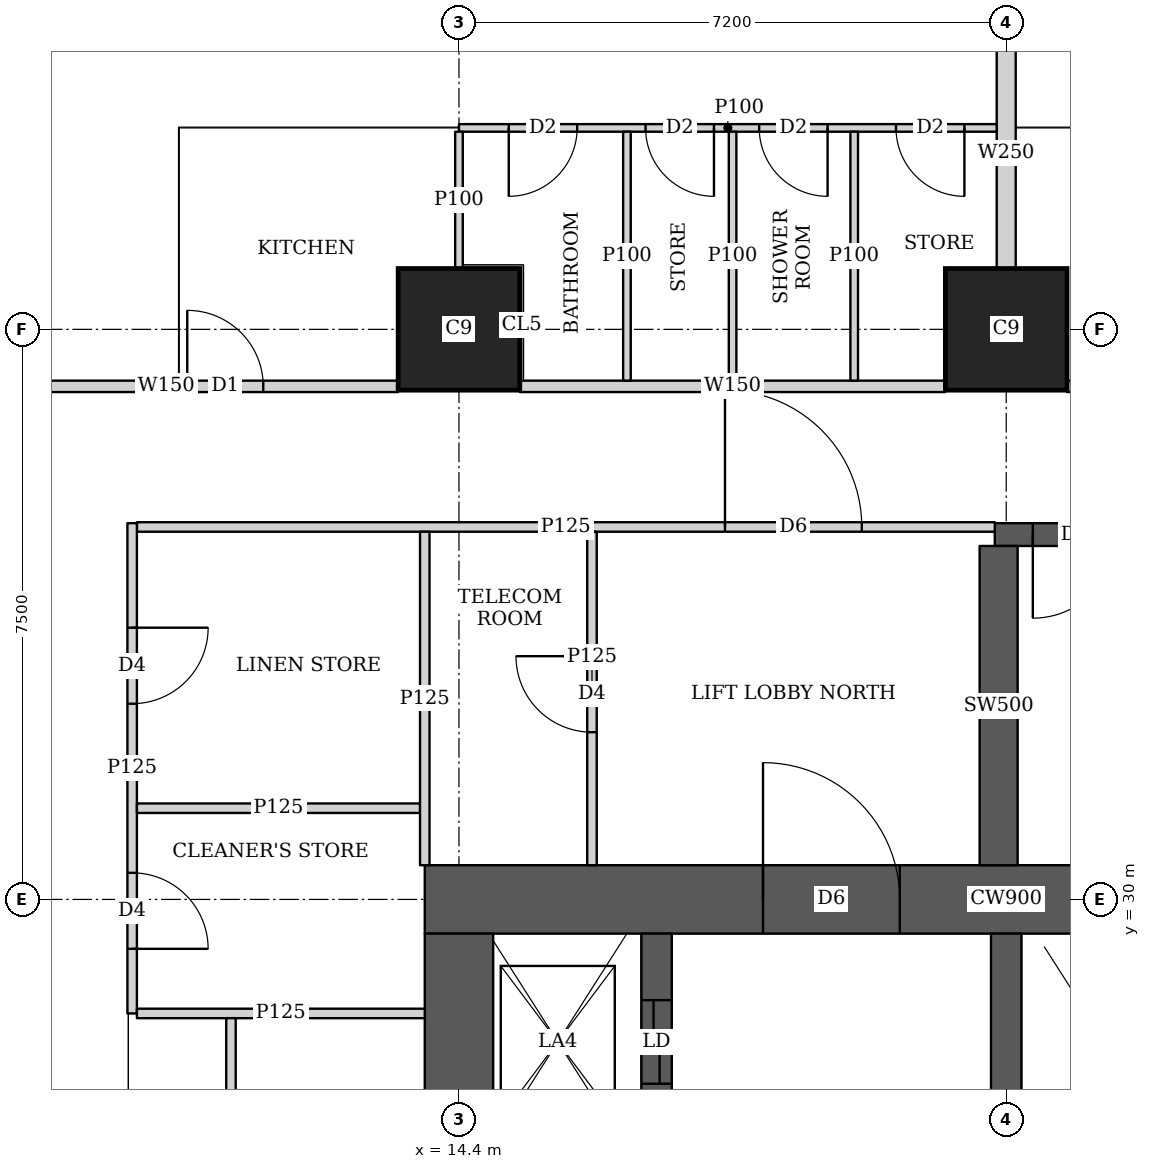
"""IFC4 building model, lengths in metres.
Left out: names, types, materials, properties, quantities, classifications, styles, units other than length and angle.
Written with IfcOpenShell. Run it as: python <this file> out.ifc"""

import sys

from ifc_helpers import new_model, si_unit, direction, frame, frame_2d, origin, origin_2d, place, context, subcontext, project, spatial, rectangle, extrude, element, fill, save


model = new_model("IFC4")
c1 = context("Model", 3, precision=1e-05, world=origin(), true_north=direction((0.0, 1.0)))
c2 = subcontext(c1, "Body", "Model", "MODEL_VIEW")
j1 = project(units=[si_unit("LENGTHUNIT", "METRE"), si_unit("PLANEANGLEUNIT", "RADIAN")], contexts=[c1])
p1 = place(None, origin())
s1 = spatial("IfcSite", under=j1, at=p1, CompositionType="ELEMENT")
p2 = place(p1, origin())
s2 = spatial("IfcBuilding", under=s1, at=p2, CompositionType="ELEMENT")
p3 = place(p2, frame((0.0, 0.0, 100.4)))
s3 = spatial("IfcBuildingStorey", under=s2, at=p3, CompositionType="ELEMENT", Elevation=100.4)
for number, where, z_axis, x_axis in (
    (1, (14.4, 37.5, 0.0), (0.0, 0.0, 1.0), (1.0, 0.0, 0.0)),
    (2, (21.6, 37.5, 0.0), (0.0, 0.0, 1.0), (1.0, 0.0, 0.0)),
):
    element("IfcColumn", number, at=place(p3, frame(where, z_axis=z_axis, x_axis=x_axis)), inside=s3, PredefinedType="COLUMN", context=c2, shape_type="SweptSolid", body=[
        extrude(rectangle(XDim=1.6, YDim=1.6, at=origin_2d()), origin(), (0.0, 0.0, 1.0), 3.75),
    ])
p4 = place(p3, frame((13.95, 30.0, 0.0), z_axis=(0.0, 0.0, 1.0), x_axis=(1.0, 0.0, 0.0)))
e3 = element("IfcWall", 3, at=p4, inside=s3, PredefinedType="SHEAR", context=c2, shape_type="SweptSolid", body=[
    extrude(rectangle(XDim=15.3, YDim=0.9, at=frame_2d((7.65, 0.0))), origin(), (0.0, 0.0, 1.0), 3.75),
])
p5 = place(p4, frame((4.45, 0.0, 0.0)))
e4 = element("IfcOpeningElement", 4, at=p5, cuts=e3, PredefinedType="OPENING", context=c2, shape_type="SweptSolid", body=[
    extrude(rectangle(XDim=1.8, YDim=2.1, at=frame_2d((0.9, 1.05))), frame((0.0, 0.46, 0.0), z_axis=(0.0, -1.0, 0.0), x_axis=(1.0, 0.0, 0.0)), (0.0, 0.0, 1.0), 0.92),
])
p6 = place(p4, frame((10.7, 0.0, 0.0)))
e5 = element("IfcOpeningElement", 5, at=p6, cuts=e3, PredefinedType="OPENING", context=c2, shape_type="SweptSolid", body=[
    extrude(rectangle(XDim=1.1, YDim=2.1, at=frame_2d((0.55, 1.05))), frame((0.0, 0.46, 0.0), z_axis=(0.0, -1.0, 0.0), x_axis=(1.0, 0.0, 0.0)), (0.0, 0.0, 1.0), 0.92),
])
p7 = place(p3, frame((14.4, 15.45, 0.0), z_axis=(0.0, 0.0, 1.0), x_axis=(0.0, 1.0, 0.0)))
e6 = element("IfcWall", 6, at=p7, inside=s3, PredefinedType="SHEAR", context=c2, shape_type="SweptSolid", body=[
    extrude(rectangle(XDim=14.1, YDim=0.9, at=frame_2d((7.05, 0.0))), origin(), (0.0, 0.0, 1.0), 3.75),
])
p8 = place(p3, frame((17.0, 15.45, 0.0), z_axis=(0.0, 0.0, 1.0), x_axis=(0.0, 1.0, 0.0)))
e7 = element("IfcWall", 7, at=p8, inside=s3, PredefinedType="SHEAR", context=c2, shape_type="SweptSolid", body=[
    extrude(rectangle(XDim=14.1, YDim=0.4, at=frame_2d((7.05, 0.0))), origin(), (0.0, 0.0, 1.0), 3.75),
])
p9 = place(p8, frame((0.875, 0.0, 0.0)))
e8 = element("IfcOpeningElement", 8, at=p9, cuts=e7, PredefinedType="OPENING", context=c2, shape_type="SweptSolid", body=[
    extrude(rectangle(XDim=1.1, YDim=2.1, at=frame_2d((0.55, 1.05))), frame((0.0, 0.21, 0.0), z_axis=(0.0, -1.0, 0.0), x_axis=(1.0, 0.0, 0.0)), (0.0, 0.0, 1.0), 0.42),
])
p10 = place(p8, frame((4.625, 0.0, 0.0)))
e9 = element("IfcOpeningElement", 9, at=p10, cuts=e7, PredefinedType="OPENING", context=c2, shape_type="SweptSolid", body=[
    extrude(rectangle(XDim=1.1, YDim=2.1, at=frame_2d((0.55, 1.05))), frame((0.0, 0.21, 0.0), z_axis=(0.0, -1.0, 0.0), x_axis=(1.0, 0.0, 0.0)), (0.0, 0.0, 1.0), 0.42),
])
p11 = place(p8, frame((8.375, 0.0, 0.0)))
e10 = element("IfcOpeningElement", 10, at=p11, cuts=e7, PredefinedType="OPENING", context=c2, shape_type="SweptSolid", body=[
    extrude(rectangle(XDim=1.1, YDim=2.1, at=frame_2d((0.55, 1.05))), frame((0.0, 0.21, 0.0), z_axis=(0.0, -1.0, 0.0), x_axis=(1.0, 0.0, 0.0)), (0.0, 0.0, 1.0), 0.42),
])
p12 = place(p8, frame((12.125, 0.0, 0.0)))
e11 = element("IfcOpeningElement", 11, at=p12, cuts=e7, PredefinedType="OPENING", context=c2, shape_type="SweptSolid", body=[
    extrude(rectangle(XDim=1.1, YDim=2.1, at=frame_2d((0.55, 1.05))), frame((0.0, 0.21, 0.0), z_axis=(0.0, -1.0, 0.0), x_axis=(1.0, 0.0, 0.0)), (0.0, 0.0, 1.0), 0.42),
])
p13 = place(p3, frame((21.6, 15.45, 0.0), z_axis=(0.0, 0.0, 1.0), x_axis=(0.0, 1.0, 0.0)))
e12 = element("IfcWall", 12, at=p13, inside=s3, PredefinedType="SHEAR", context=c2, shape_type="SweptSolid", body=[
    extrude(rectangle(XDim=14.1, YDim=0.4, at=frame_2d((7.05, 0.0))), origin(), (0.0, 0.0, 1.0), 3.75),
])
p14 = place(p3, frame((21.45, 34.8, 0.0), z_axis=(0.0, 0.0, 1.0), x_axis=(1.0, 0.0, 0.0)))
e13 = element("IfcWall", 13, at=p14, inside=s3, PredefinedType="SHEAR", context=c2, shape_type="SweptSolid", body=[
    extrude(rectangle(XDim=7.5, YDim=0.3, at=frame_2d((3.75, 0.0))), origin(), (0.0, 0.0, 1.0), 3.75),
])
p15 = place(p14, frame((0.5, 0.0, 0.0)))
e14 = element("IfcOpeningElement", 14, at=p15, cuts=e13, PredefinedType="OPENING", context=c2, shape_type="SweptSolid", body=[
    extrude(rectangle(XDim=1.1, YDim=2.1, at=frame_2d((0.55, 1.05))), frame((0.0, 0.16, 0.0), z_axis=(0.0, -1.0, 0.0), x_axis=(1.0, 0.0, 0.0)), (0.0, 0.0, 1.0), 0.32),
])
p16 = place(p3, frame((21.5, 30.45, 0.0), z_axis=(0.0, 0.0, 1.0), x_axis=(0.0, 1.0, 0.0)))
e15 = element("IfcWall", 15, at=p16, inside=s3, PredefinedType="SHEAR", context=c2, shape_type="SweptSolid", body=[
    extrude(rectangle(XDim=4.2, YDim=0.5, at=frame_2d((2.1, 0.0))), origin(), (0.0, 0.0, 1.0), 3.75),
])
p17 = place(p3, frame((8.1, 36.75, 0.0), z_axis=(0.0, 0.0, 1.0), x_axis=(1.0, 0.0, 0.0)))
e16 = element("IfcWall", 16, at=p17, inside=s3, PredefinedType="SOLIDWALL", context=c2, shape_type="SweptSolid", body=[
    extrude(rectangle(XDim=5.499, YDim=0.15, at=frame_2d((2.75, 0.0))), origin(), (0.0, 0.0, 1.0), 3.5),
])
p18 = place(p17, frame((2.725, 0.0, 0.0)))
e17 = element("IfcOpeningElement", 17, at=p18, cuts=e16, PredefinedType="OPENING", context=c2, shape_type="SweptSolid", body=[
    extrude(rectangle(XDim=1.0, YDim=2.1, at=frame_2d((0.5, 1.05))), frame((0.0, 0.085, 0.0), z_axis=(0.0, -1.0, 0.0), x_axis=(1.0, 0.0, 0.0)), (0.0, 0.0, 1.0), 0.17),
])
p19 = place(p3, frame((15.201, 36.75, 0.0), z_axis=(0.0, 0.0, 1.0), x_axis=(1.0, 0.0, 0.0)))
e18 = element("IfcWall", 18, at=p19, inside=s3, PredefinedType="SOLIDWALL", context=c2, shape_type="SweptSolid", body=[
    extrude(rectangle(XDim=5.598, YDim=0.15, at=frame_2d((2.799, 0.0))), origin(), (0.0, 0.0, 1.0), 3.5),
])
p20 = place(p3, frame((22.401, 36.75, 0.0), z_axis=(0.0, 0.0, 1.0), x_axis=(1.0, 0.0, 0.0)))
e19 = element("IfcWall", 19, at=p20, inside=s3, PredefinedType="SOLIDWALL", context=c2, shape_type="SweptSolid", body=[
    extrude(rectangle(XDim=5.598, YDim=0.15, at=frame_2d((2.799, 0.0))), origin(), (0.0, 0.0, 1.0), 3.5),
])
p21 = place(p20, frame((0.699, 0.0, 0.0)))
e20 = element("IfcOpeningElement", 20, at=p21, cuts=e19, PredefinedType="OPENING", context=c2, shape_type="SweptSolid", body=[
    extrude(rectangle(XDim=1.0, YDim=2.1, at=frame_2d((0.5, 1.05))), frame((0.0, 0.085, 0.0), z_axis=(0.0, -1.0, 0.0), x_axis=(1.0, 0.0, 0.0)), (0.0, 0.0, 1.0), 0.17),
])
p22 = place(p3, frame((14.4, 40.15, 0.0), z_axis=(0.0, 0.0, 1.0), x_axis=(1.0, 0.0, 0.0)))
e21 = element("IfcWall", 21, at=p22, inside=s3, PredefinedType="PARTITIONING", context=c2, shape_type="SweptSolid", body=[
    extrude(rectangle(XDim=7.075, YDim=0.1, at=frame_2d((3.538, 0.0))), origin(), (0.0, 0.0, 1.0), 3.5),
])
p23 = place(p22, frame((0.655, 0.0, 0.0)))
e22 = element("IfcOpeningElement", 22, at=p23, cuts=e21, PredefinedType="OPENING", context=c2, shape_type="SweptSolid", body=[
    extrude(rectangle(XDim=0.9, YDim=2.1, at=frame_2d((0.45, 1.05))), frame((0.0, 0.06, 0.0), z_axis=(0.0, -1.0, 0.0), x_axis=(1.0, 0.0, 0.0)), (0.0, 0.0, 1.0), 0.12),
])
p24 = place(p22, frame((3.95, 0.0, 0.0)))
e23 = element("IfcOpeningElement", 23, at=p24, cuts=e21, PredefinedType="OPENING", context=c2, shape_type="SweptSolid", body=[
    extrude(rectangle(XDim=0.9, YDim=2.1, at=frame_2d((0.45, 1.05))), frame((0.0, 0.06, 0.0), z_axis=(0.0, -1.0, 0.0), x_axis=(1.0, 0.0, 0.0)), (0.0, 0.0, 1.0), 0.12),
])
p25 = place(p22, frame((2.455, 0.0, 0.0)))
e24 = element("IfcOpeningElement", 24, at=p25, cuts=e21, PredefinedType="OPENING", context=c2, shape_type="SweptSolid", body=[
    extrude(rectangle(XDim=0.9, YDim=2.1, at=frame_2d((0.45, 1.05))), frame((0.0, 0.06, 0.0), z_axis=(0.0, -1.0, 0.0), x_axis=(1.0, 0.0, 0.0)), (0.0, 0.0, 1.0), 0.12),
])
p26 = place(p22, frame((5.75, 0.0, 0.0)))
e25 = element("IfcOpeningElement", 25, at=p26, cuts=e21, PredefinedType="OPENING", context=c2, shape_type="SweptSolid", body=[
    extrude(rectangle(XDim=0.9, YDim=2.1, at=frame_2d((0.45, 1.05))), frame((0.0, 0.06, 0.0), z_axis=(0.0, -1.0, 0.0), x_axis=(1.0, 0.0, 0.0)), (0.0, 0.0, 1.0), 0.12),
])
p27 = place(p3, frame((14.4, 38.301, 0.0), z_axis=(0.0, 0.0, 1.0), x_axis=(0.0, 1.0, 0.0)))
e26 = element("IfcWall", 26, at=p27, inside=s3, PredefinedType="PARTITIONING", context=c2, shape_type="SweptSolid", body=[
    extrude(rectangle(XDim=1.799, YDim=0.1, at=frame_2d((0.899, 0.0))), origin(), (0.0, 0.0, 1.0), 3.5),
])
for number, where, z_axis, x_axis in (
    (27, (18.0, 36.825, 0.0), (0.0, 0.0, 1.0), (0.0, 1.0, 0.0)),
    (28, (16.61, 36.825, 0.0), (0.0, 0.0, 1.0), (0.0, 1.0, 0.0)),
    (29, (19.6, 36.825, 0.0), (0.0, 0.0, 1.0), (0.0, 1.0, 0.0)),
):
    element("IfcWall", number, at=place(p3, frame(where, z_axis=z_axis, x_axis=x_axis)), inside=s3, PredefinedType="PARTITIONING", context=c2, shape_type="SweptSolid", body=[
        extrude(rectangle(XDim=3.275, YDim=0.1, at=frame_2d((1.638, 0.0))), origin(), (0.0, 0.0, 1.0), 3.5),
    ])
p28 = place(p3, frame((21.6, 38.301, 0.0), z_axis=(0.0, 0.0, 1.0), x_axis=(0.0, 1.0, 0.0)))
e30 = element("IfcWall", 30, at=p28, inside=s3, PredefinedType="SOLIDWALL", context=c2, shape_type="SweptSolid", body=[
    extrude(rectangle(XDim=3.049, YDim=0.25, at=frame_2d((1.524, 0.0))), origin(), (0.0, 0.0, 1.0), 3.5),
])
p29 = place(p3, frame((10.1, 28.5, 0.0), z_axis=(0.0, 0.0, 1.0), x_axis=(0.0, 1.0, 0.0)))
e31 = element("IfcWall", 31, at=p29, inside=s3, PredefinedType="PARTITIONING", context=c2, shape_type="SweptSolid", body=[
    extrude(rectangle(XDim=6.45, YDim=0.125, at=frame_2d((3.225, 0.0))), origin(), (0.0, 0.0, 1.0), 3.5),
])
p30 = place(p29, frame((0.85, 0.0, 0.0)))
e32 = element("IfcOpeningElement", 32, at=p30, cuts=e31, PredefinedType="OPENING", context=c2, shape_type="SweptSolid", body=[
    extrude(rectangle(XDim=1.0, YDim=2.1, at=frame_2d((0.5, 1.05))), frame((0.0, 0.073, 0.0), z_axis=(0.0, -1.0, 0.0), x_axis=(1.0, 0.0, 0.0)), (0.0, 0.0, 1.0), 0.145),
])
p31 = place(p29, frame((4.075, 0.0, 0.0)))
e33 = element("IfcOpeningElement", 33, at=p31, cuts=e31, PredefinedType="OPENING", context=c2, shape_type="SweptSolid", body=[
    extrude(rectangle(XDim=1.0, YDim=2.1, at=frame_2d((0.5, 1.05))), frame((0.0, 0.073, 0.0), z_axis=(0.0, -1.0, 0.0), x_axis=(1.0, 0.0, 0.0)), (0.0, 0.0, 1.0), 0.145),
])
p32 = place(p3, frame((11.4, 19.562, 0.0), z_axis=(0.0, 0.0, 1.0), x_axis=(0.0, 1.0, 0.0)))
e34 = element("IfcWall", 34, at=p32, inside=s3, PredefinedType="PARTITIONING", context=c2, shape_type="SweptSolid", body=[
    extrude(rectangle(XDim=8.876, YDim=0.125, at=frame_2d((4.438, 0.0))), origin(), (0.0, 0.0, 1.0), 3.5),
])
p33 = place(p32, frame((3.938, 0.0, 0.0)))
e35 = element("IfcOpeningElement", 35, at=p33, cuts=e34, PredefinedType="OPENING", context=c2, shape_type="SweptSolid", body=[
    extrude(rectangle(XDim=1.0, YDim=2.1, at=frame_2d((0.5, 1.05))), frame((0.0, 0.073, 0.0), z_axis=(0.0, -1.0, 0.0), x_axis=(1.0, 0.0, 0.0)), (0.0, 0.0, 1.0), 0.145),
])
p34 = place(p3, frame((10.163, 28.5, 0.0), z_axis=(0.0, 0.0, 1.0), x_axis=(1.0, 0.0, 0.0)))
e36 = element("IfcWall", 36, at=p34, inside=s3, PredefinedType="PARTITIONING", context=c2, shape_type="SweptSolid", body=[
    extrude(rectangle(XDim=3.787, YDim=0.125, at=frame_2d((1.894, 0.0))), origin(), (0.0, 0.0, 1.0), 3.5),
])
p35 = place(p3, frame((10.163, 31.2, 0.0), z_axis=(0.0, 0.0, 1.0), x_axis=(1.0, 0.0, 0.0)))
e37 = element("IfcWall", 37, at=p35, inside=s3, PredefinedType="PARTITIONING", context=c2, shape_type="SweptSolid", body=[
    extrude(rectangle(XDim=3.725, YDim=0.125, at=frame_2d((1.862, 0.0))), origin(), (0.0, 0.0, 1.0), 3.5),
])
p36 = place(p3, frame((13.95, 30.45, 0.0), z_axis=(0.0, 0.0, 1.0), x_axis=(0.0, 1.0, 0.0)))
e38 = element("IfcWall", 38, at=p36, inside=s3, PredefinedType="PARTITIONING", context=c2, shape_type="SweptSolid", body=[
    extrude(rectangle(XDim=4.387, YDim=0.125, at=frame_2d((2.193, 0.0))), origin(), (0.0, 0.0, 1.0), 3.5),
])
p37 = place(p3, frame((10.163, 34.9, 0.0), z_axis=(0.0, 0.0, 1.0), x_axis=(1.0, 0.0, 0.0)))
e39 = element("IfcWall", 39, at=p37, inside=s3, PredefinedType="PARTITIONING", context=c2, shape_type="SweptSolid", body=[
    extrude(rectangle(XDim=11.287, YDim=0.125, at=frame_2d((5.644, 0.0))), origin(), (0.0, 0.0, 1.0), 3.5),
])
p38 = place(p37, frame((7.737, 0.0, 0.0)))
e40 = element("IfcOpeningElement", 40, at=p38, cuts=e39, PredefinedType="OPENING", context=c2, shape_type="SweptSolid", body=[
    extrude(rectangle(XDim=1.8, YDim=2.1, at=frame_2d((0.9, 1.05))), frame((0.0, 0.073, 0.0), z_axis=(0.0, -1.0, 0.0), x_axis=(1.0, 0.0, 0.0)), (0.0, 0.0, 1.0), 0.145),
])
p39 = place(p3, frame((16.15, 30.45, 0.0), z_axis=(0.0, 0.0, 1.0), x_axis=(0.0, 1.0, 0.0)))
e41 = element("IfcWall", 41, at=p39, inside=s3, PredefinedType="PARTITIONING", context=c2, shape_type="SweptSolid", body=[
    extrude(rectangle(XDim=4.387, YDim=0.125, at=frame_2d((2.193, 0.0))), origin(), (0.0, 0.0, 1.0), 3.5),
])
p40 = place(p39, frame((1.75, 0.0, 0.0)))
e42 = element("IfcOpeningElement", 42, at=p40, cuts=e41, PredefinedType="OPENING", context=c2, shape_type="SweptSolid", body=[
    extrude(rectangle(XDim=1.0, YDim=2.1, at=frame_2d((0.5, 1.05))), frame((0.0, 0.073, 0.0), z_axis=(0.0, -1.0, 0.0), x_axis=(1.0, 0.0, 0.0)), (0.0, 0.0, 1.0), 0.145),
])
p41 = place(p23, origin())
e43 = element("IfcDoor", 43, at=p41, inside=s3, OperationType="SINGLE_SWING_RIGHT", PredefinedType="DOOR", context=c2, shape_type="SweptSolid", body=[
    extrude(rectangle(XDim=0.9, YDim=2.1, at=frame_2d((0.45, 1.05))), frame((0.0, 0.025, 0.0), z_axis=(0.0, -1.0, 0.0), x_axis=(1.0, 0.0, 0.0)), (0.0, 0.0, 1.0), 0.05),
])
fill(e22, e43)
p42 = place(p24, origin())
e44 = element("IfcDoor", 44, at=p42, inside=s3, OperationType="SINGLE_SWING_LEFT", PredefinedType="DOOR", context=c2, shape_type="SweptSolid", body=[
    extrude(rectangle(XDim=0.9, YDim=2.1, at=frame_2d((0.45, 1.05))), frame((0.0, 0.025, 0.0), z_axis=(0.0, -1.0, 0.0), x_axis=(1.0, 0.0, 0.0)), (0.0, 0.0, 1.0), 0.05),
])
fill(e23, e44)
p43 = place(p25, origin())
e45 = element("IfcDoor", 45, at=p43, inside=s3, OperationType="SINGLE_SWING_LEFT", PredefinedType="DOOR", context=c2, shape_type="SweptSolid", body=[
    extrude(rectangle(XDim=0.9, YDim=2.1, at=frame_2d((0.45, 1.05))), frame((0.0, 0.025, 0.0), z_axis=(0.0, -1.0, 0.0), x_axis=(1.0, 0.0, 0.0)), (0.0, 0.0, 1.0), 0.05),
])
fill(e24, e45)
p44 = place(p26, origin())
e46 = element("IfcDoor", 46, at=p44, inside=s3, OperationType="SINGLE_SWING_LEFT", PredefinedType="DOOR", context=c2, shape_type="SweptSolid", body=[
    extrude(rectangle(XDim=0.9, YDim=2.1, at=frame_2d((0.45, 1.05))), frame((0.0, 0.025, 0.0), z_axis=(0.0, -1.0, 0.0), x_axis=(1.0, 0.0, 0.0)), (0.0, 0.0, 1.0), 0.05),
])
fill(e25, e46)
p45 = place(p18, origin())
e47 = element("IfcDoor", 47, at=p45, inside=s3, OperationType="SINGLE_SWING_LEFT", PredefinedType="DOOR", context=c2, shape_type="SweptSolid", body=[
    extrude(rectangle(XDim=1.0, YDim=2.1, at=frame_2d((0.5, 1.05))), frame((0.0, 0.025, 0.0), z_axis=(0.0, -1.0, 0.0), x_axis=(1.0, 0.0, 0.0)), (0.0, 0.0, 1.0), 0.05),
])
fill(e17, e47)
p46 = place(p30, origin())
e48 = element("IfcDoor", 48, at=p46, inside=s3, OperationType="SINGLE_SWING_RIGHT", PredefinedType="DOOR", context=c2, shape_type="SweptSolid", body=[
    extrude(rectangle(XDim=1.0, YDim=2.1, at=frame_2d((0.5, 1.05))), frame((0.0, 0.025, 0.0), z_axis=(0.0, -1.0, 0.0), x_axis=(1.0, 0.0, 0.0)), (0.0, 0.0, 1.0), 0.05),
])
fill(e32, e48)
p47 = place(p31, origin())
e49 = element("IfcDoor", 49, at=p47, inside=s3, OperationType="SINGLE_SWING_LEFT", PredefinedType="DOOR", context=c2, shape_type="SweptSolid", body=[
    extrude(rectangle(XDim=1.0, YDim=2.1, at=frame_2d((0.5, 1.05))), frame((0.0, 0.025, 0.0), z_axis=(0.0, -1.0, 0.0), x_axis=(1.0, 0.0, 0.0)), (0.0, 0.0, 1.0), 0.05),
])
fill(e33, e49)
p48 = place(p40, origin())
e50 = element("IfcDoor", 50, at=p48, inside=s3, OperationType="SINGLE_SWING_RIGHT", PredefinedType="DOOR", context=c2, shape_type="SweptSolid", body=[
    extrude(rectangle(XDim=1.0, YDim=2.1, at=frame_2d((0.5, 1.05))), frame((0.0, 0.025, 0.0), z_axis=(0.0, -1.0, 0.0), x_axis=(1.0, 0.0, 0.0)), (0.0, 0.0, 1.0), 0.05),
])
fill(e42, e50)
p49 = place(p38, origin())
e51 = element("IfcDoor", 51, at=p49, inside=s3, OperationType="DOUBLE_DOOR_SINGLE_SWING", PredefinedType="DOOR", context=c2, shape_type="SweptSolid", body=[
    extrude(rectangle(XDim=1.8, YDim=2.1, at=frame_2d((0.9, 1.05))), frame((0.0, 0.025, 0.0), z_axis=(0.0, -1.0, 0.0), x_axis=(1.0, 0.0, 0.0)), (0.0, 0.0, 1.0), 0.05),
])
fill(e40, e51)
p50 = place(p5, origin())
e52 = element("IfcDoor", 52, at=p50, inside=s3, OperationType="DOUBLE_DOOR_SINGLE_SWING", PredefinedType="DOOR", context=c2, shape_type="SweptSolid", body=[
    extrude(rectangle(XDim=1.8, YDim=2.1, at=frame_2d((0.9, 1.05))), frame((0.0, 0.025, 0.0), z_axis=(0.0, -1.0, 0.0), x_axis=(1.0, 0.0, 0.0)), (0.0, 0.0, 1.0), 0.05),
])
fill(e4, e52)
p51 = place(p12, origin())
e53 = element("IfcDoor", 53, at=p51, inside=s3, OperationType="DOUBLE_DOOR_SLIDING", PredefinedType="DOOR", context=c2, shape_type="SweptSolid", body=[
    extrude(rectangle(XDim=1.1, YDim=2.1, at=frame_2d((0.55, 1.05))), frame((0.0, 0.025, 0.0), z_axis=(0.0, -1.0, 0.0), x_axis=(1.0, 0.0, 0.0)), (0.0, 0.0, 1.0), 0.05),
])
fill(e11, e53)
p52 = place(p15, origin())
e54 = element("IfcDoor", 54, at=p52, inside=s3, OperationType="SINGLE_SWING_RIGHT", PredefinedType="DOOR", context=c2, shape_type="SweptSolid", body=[
    extrude(rectangle(XDim=1.1, YDim=2.1, at=frame_2d((0.55, 1.05))), frame((0.0, 0.025, 0.0), z_axis=(0.0, -1.0, 0.0), x_axis=(1.0, 0.0, 0.0)), (0.0, 0.0, 1.0), 0.05),
])
fill(e14, e54)
save(model, sys.argv[1])
